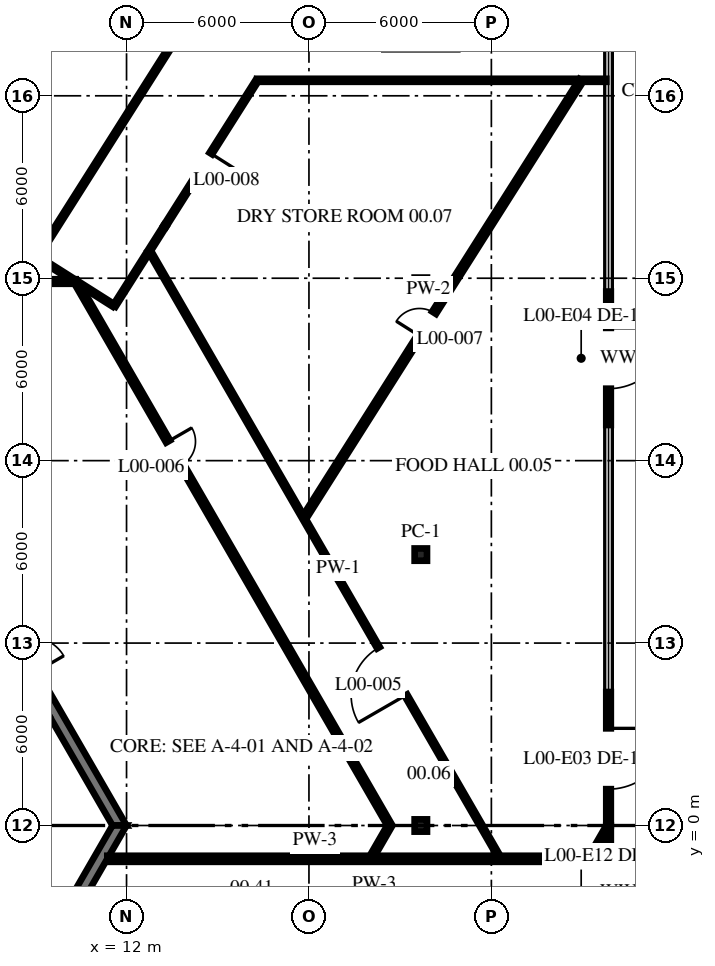
"""IFC4 building model, lengths in metres.
Left out: names, types, materials, properties, quantities, classifications, styles, units other than length and angle.
Written with IfcOpenShell. Run it as: python <this file> out.ifc"""

import sys

from ifc_helpers import new_model, si_unit, direction, frame, frame_2d, origin, origin_2d, place, context, subcontext, project, spatial, polyline, rectangle, i_section, outline, extrude, source, transform, mapped, element, fill, save


model = new_model("IFC4")
c1 = context("Model", 3, precision=1e-05, world=origin(), true_north=direction((0.0, 1.0)))
c2 = subcontext(c1, "Body", "Model", "MODEL_VIEW")
j1 = project(units=[si_unit("LENGTHUNIT", "METRE"), si_unit("PLANEANGLEUNIT", "RADIAN")], contexts=[c1])
p1 = place(None, origin())
s1 = spatial("IfcSite", under=j1, at=p1, CompositionType="ELEMENT")
p2 = place(p1, origin())
s2 = spatial("IfcBuilding", under=s1, at=p2, CompositionType="ELEMENT")
p3 = place(p2, origin())
s3 = spatial("IfcBuildingStorey", under=s2, at=p3, CompositionType="ELEMENT", Elevation=0.0)
m1 = source(origin(), c2, "Body", "SweptSolid", [
    extrude(i_section(OverallWidth=0.404, OverallDepth=0.406, WebThickness=0.027, FlangeThickness=0.044, at=origin_2d()), origin(), (0.0, 0.0, 1.0), 7.2),
])
for number, where, z_axis, x_axis in (
    (1, (21.679, 0.0, -0.2), (0.0, 0.0, 1.0), (0.0, 1.0, 0.0)),
    (2, (21.679, 8.91, -0.2), (0.0, 0.0, 1.0), (0.0, 1.0, 0.0)),
    (3, (21.679, 17.82, -0.2), (0.0, 0.0, 1.0), (0.0, 1.0, 0.0)),
):
    element("IfcColumn", number, at=place(p3, frame(where, z_axis=z_axis, x_axis=x_axis)), inside=s3, PredefinedType="COLUMN", context=c2, shape_type="MappedRepresentation", body=[
        mapped(m1, transform((0.0, 0.0, 0.0), scale=1.0)),
    ])
m2 = source(origin(), c2, "Body", "SweptSolid", [
    extrude(outline(polyline([(-0.115, -0.2), (11.885, -0.2), (11.654, 0.2), (0.115, 0.2), (-0.115, -0.2)])), origin(), (0.0, 0.0, 1.0), 7.0),
])
p4 = place(p3, frame((11.769, 0.0, -0.2), z_axis=(0.0, 0.0, 1.0), x_axis=(-0.499996592174, 0.866027371285, 0.0)))
e4 = element("IfcWall", 4, at=p4, inside=s3, PredefinedType="SHEAR", context=c2, shape_type="MappedRepresentation", body=[
    mapped(m2, transform((0.0, 0.0, 0.0), scale=1.0)),
])
p5 = place(p4, frame((5.75, 0.0, 0.2)))
e5 = element("IfcOpeningElement", 5, at=p5, cuts=e4, PredefinedType="OPENING", context=c2, shape_type="SweptSolid", body=[
    extrude(rectangle(XDim=1.2, YDim=2.1, at=frame_2d((0.6, 1.05))), frame((0.0, 0.21, 0.0), z_axis=(0.0, -1.0, 0.0), x_axis=(1.0, 0.0, 0.0)), (0.0, 0.0, 1.0), 0.42),
])
p6 = place(p3, frame((5.885, -10.192, -0.2), z_axis=(0.0, 0.0, 1.0), x_axis=(0.499996592174, 0.866027371285, 0.0)))
e6 = element("IfcWall", 6, at=p6, inside=s3, PredefinedType="SHEAR", context=c2, shape_type="MappedRepresentation", body=[
    mapped(m2, transform((0.0, 0.0, 0.0), scale=1.0)),
])
p7 = place(p6, frame((3.665, 0.0, 0.2)))
e7 = element("IfcOpeningElement", 7, at=p7, cuts=e6, PredefinedType="OPENING", context=c2, shape_type="SweptSolid", body=[
    extrude(rectangle(XDim=1.2, YDim=2.1, at=frame_2d((0.6, 1.05))), frame((0.0, 0.21, 0.0), z_axis=(0.0, -1.0, 0.0), x_axis=(1.0, 0.0, 0.0)), (0.0, 0.0, 1.0), 0.42),
])
m3 = source(origin(), c2, "Body", "SweptSolid", [
    extrude(rectangle(XDim=4.391, YDim=0.15, at=frame_2d((2.195, 0.0))), origin(), (0.0, 0.0, 1.0), 6.8),
])
p8 = place(p3, frame((27.854, 0.0, 0.0), z_axis=(0.0, 0.0, 1.0), x_axis=(0.0, -1.0, 0.0)))
e8 = element("IfcWall", 8, at=p8, inside=s3, PredefinedType="ELEMENTEDWALL", context=c2, shape_type="MappedRepresentation", body=[
    mapped(m3, transform((0.0, 0.0, 0.0), scale=1.0)),
])
p9 = place(p8, frame((1.195, 0.0, 0.0)))
e9 = element("IfcOpeningElement", 9, at=p9, cuts=e8, PredefinedType="OPENING", context=c2, shape_type="SweptSolid", body=[
    extrude(rectangle(XDim=2.0, YDim=2.7, at=frame_2d((1.0, 1.35))), frame((0.0, 0.085, 0.0), z_axis=(0.0, -1.0, 0.0), x_axis=(1.0, 0.0, 0.0)), (0.0, 0.0, 1.0), 0.17),
])
p10 = place(p3, frame((27.854, 4.391, 0.0), z_axis=(0.0, 0.0, 1.0), x_axis=(0.0, -1.0, 0.0)))
e10 = element("IfcWall", 10, at=p10, inside=s3, PredefinedType="ELEMENTEDWALL", context=c2, shape_type="MappedRepresentation", body=[
    mapped(m3, transform((0.0, 0.0, 0.0), scale=1.0)),
])
p11 = place(p10, frame((1.195, 0.0, 0.0)))
e11 = element("IfcOpeningElement", 11, at=p11, cuts=e10, PredefinedType="OPENING", context=c2, shape_type="SweptSolid", body=[
    extrude(rectangle(XDim=2.0, YDim=2.7, at=frame_2d((1.0, 1.35))), frame((0.0, 0.085, 0.0), z_axis=(0.0, -1.0, 0.0), x_axis=(1.0, 0.0, 0.0)), (0.0, 0.0, 1.0), 0.17),
])
m4 = source(origin(), c2, "Body", "SweptSolid", [
    extrude(rectangle(XDim=4.39, YDim=0.15, at=frame_2d((2.195, 0.0))), origin(), (0.0, 0.0, 1.0), 6.8),
])
p12 = place(p3, frame((27.854, 17.562, 0.0), z_axis=(0.0, 0.0, 1.0), x_axis=(0.0, -1.0, 0.0)))
e12 = element("IfcWall", 12, at=p12, inside=s3, PredefinedType="ELEMENTEDWALL", context=c2, shape_type="MappedRepresentation", body=[
    mapped(m4, transform((0.0, 0.0, 0.0), scale=1.0)),
])
p13 = place(p12, frame((1.195, 0.0, 0.0)))
e13 = element("IfcOpeningElement", 13, at=p13, cuts=e12, PredefinedType="OPENING", context=c2, shape_type="SweptSolid", body=[
    extrude(rectangle(XDim=2.0, YDim=2.7, at=frame_2d((1.0, 1.35))), frame((0.0, 0.085, 0.0), z_axis=(0.0, -1.0, 0.0), x_axis=(1.0, 0.0, 0.0)), (0.0, 0.0, 1.0), 0.17),
])
p14 = place(p3, frame((10.351, 17.856, 0.0), z_axis=(0.0, 0.0, 1.0), x_axis=(0.499999528265, -0.866025676141, 0.0)))
e14 = element("IfcWall", 14, at=p14, inside=s3, PredefinedType="PARTITIONING", context=c2, shape_type="SweptSolid", body=[
    extrude(rectangle(XDim=20.568, YDim=0.15, at=frame_2d((10.284, 0.0))), origin(), (0.0, 0.0, 1.0), 6.8),
])
p15 = place(p14, frame((6.034, 0.0, 0.0)))
e15 = element("IfcOpeningElement", 15, at=p15, cuts=e14, PredefinedType="OPENING", context=c2, shape_type="SweptSolid", body=[
    extrude(rectangle(XDim=0.9, YDim=2.1, at=frame_2d((0.45, 1.05))), frame((0.0, 0.085, 0.0), z_axis=(0.0, -1.0, 0.0), x_axis=(1.0, 0.0, 0.0)), (0.0, 0.0, 1.0), 0.17),
])
p16 = place(p3, frame((12.747, 18.905, 0.0), z_axis=(0.0, 0.0, 1.0), x_axis=(0.500003565856, -0.866023345027, 0.0)))
e16 = element("IfcWall", 16, at=p16, inside=s3, PredefinedType="PARTITIONING", context=c2, shape_type="SweptSolid", body=[
    extrude(rectangle(XDim=22.979, YDim=0.1, at=frame_2d((11.49, 0.0))), origin(), (0.0, 0.0, 1.0), 6.8),
])
p17 = place(p16, frame((15.08, 0.0, 0.0)))
e17 = element("IfcOpeningElement", 17, at=p17, cuts=e16, PredefinedType="OPENING", context=c2, shape_type="SweptSolid", body=[
    extrude(rectangle(XDim=1.8, YDim=2.4, at=frame_2d((0.9, 1.2))), frame((0.0, 0.06, 0.0), z_axis=(0.0, -1.0, 0.0), x_axis=(1.0, 0.0, 0.0)), (0.0, 0.0, 1.0), 0.12),
])
p18 = place(p3, frame((9.088, 18.679, 0.0), z_axis=(0.0, 0.0, 1.0), x_axis=(0.8447740423, -0.535123179704, 0.0)))
e18 = element("IfcWall", 18, at=p18, inside=s3, PredefinedType="PARTITIONING", context=c2, shape_type="SweptSolid", body=[
    extrude(rectangle(XDim=2.941, YDim=0.1, at=frame_2d((1.47, 0.0))), origin(), (0.0, 0.0, 1.0), 6.8),
])
p19 = place(p3, frame((-10.28, 17.892, 0.0), z_axis=(0.0, 0.0, 1.0), x_axis=(1.0, 0.0, 0.0)))
e19 = element("IfcWall", 19, at=p19, inside=s3, PredefinedType="PARTITIONING", context=c2, shape_type="SweptSolid", body=[
    extrude(rectangle(XDim=20.608, YDim=0.15, at=frame_2d((10.304, 0.0))), origin(), (0.0, 0.0, 1.0), 6.8),
])
p20 = place(p19, frame((4.162, 0.0, 0.0)))
e20 = element("IfcOpeningElement", 20, at=p20, cuts=e19, PredefinedType="OPENING", context=c2, shape_type="SweptSolid", body=[
    extrude(rectangle(XDim=1.8, YDim=2.4, at=frame_2d((0.9, 1.2))), frame((0.0, 0.085, 0.0), z_axis=(0.0, -1.0, 0.0), x_axis=(1.0, 0.0, 0.0)), (0.0, 0.0, 1.0), 0.17),
])
p21 = place(p19, frame((14.56, 0.0, 0.0)))
e21 = element("IfcOpeningElement", 21, at=p21, cuts=e19, PredefinedType="OPENING", context=c2, shape_type="SweptSolid", body=[
    extrude(rectangle(XDim=0.9, YDim=2.1, at=frame_2d((0.45, 1.05))), frame((0.0, 0.085, 0.0), z_axis=(0.0, -1.0, 0.0), x_axis=(1.0, 0.0, 0.0)), (0.0, 0.0, 1.0), 0.17),
])
p22 = place(p3, frame((16.298, 24.51, 0.0), z_axis=(0.0, 0.0, 1.0), x_axis=(1.0, 0.0, 0.0)))
e22 = element("IfcWall", 22, at=p22, inside=s3, PredefinedType="PARTITIONING", context=c2, shape_type="SweptSolid", body=[
    extrude(rectangle(XDim=11.482, YDim=0.1, at=frame_2d((5.741, 0.0))), origin(), (0.0, 0.0, 1.0), 6.8),
])
p23 = place(p3, frame((17.874, 10.168, 0.0), z_axis=(0.0, 0.0, 1.0), x_axis=(0.535111950981, 0.844781155044, 0.0)))
e23 = element("IfcWall", 23, at=p23, inside=s3, PredefinedType="PARTITIONING", context=c2, shape_type="SweptSolid", body=[
    extrude(rectangle(XDim=16.977, YDim=0.15, at=frame_2d((8.489, 0.0))), origin(), (0.0, 0.0, 1.0), 6.8),
])
p24 = place(p23, frame((7.027, 0.0, 0.0)))
e24 = element("IfcOpeningElement", 24, at=p24, cuts=e23, PredefinedType="OPENING", context=c2, shape_type="SweptSolid", body=[
    extrude(rectangle(XDim=0.9, YDim=2.1, at=frame_2d((0.45, 1.05))), frame((0.0, 0.085, 0.0), z_axis=(0.0, -1.0, 0.0), x_axis=(1.0, 0.0, 0.0)), (0.0, 0.0, 1.0), 0.17),
])
p25 = place(p3, frame((11.597, 17.09, 0.0), z_axis=(0.0, 0.0, 1.0), x_axis=(0.535087540536, 0.844796616922, 0.0)))
e25 = element("IfcWall", 25, at=p25, inside=s3, PredefinedType="PARTITIONING", context=c2, shape_type="SweptSolid", body=[
    extrude(rectangle(XDim=3.112, YDim=0.1, at=frame_2d((1.556, 0.0))), origin(), (0.0, 0.0, 1.0), 6.8),
])
p26 = place(p3, frame((13.263, 19.719, 0.0), z_axis=(0.0, 0.0, 1.0), x_axis=(0.535130183749, 0.844769605538, 0.0)))
e26 = element("IfcWall", 26, at=p26, inside=s3, PredefinedType="PARTITIONING", context=c2, shape_type="SweptSolid", body=[
    extrude(rectangle(XDim=5.652, YDim=0.1, at=frame_2d((2.826, 0.0))), origin(), (0.0, 0.0, 1.0), 6.117),
])
p27 = place(p26, frame((1.922, 0.0, 0.0)))
e27 = element("IfcOpeningElement", 27, at=p27, cuts=e26, PredefinedType="OPENING", context=c2, shape_type="SweptSolid", body=[
    extrude(rectangle(XDim=0.9, YDim=2.1, at=frame_2d((0.45, 1.05))), frame((0.0, 0.06, 0.0), z_axis=(0.0, -1.0, 0.0), x_axis=(1.0, 0.0, 0.0)), (0.0, 0.0, 1.0), 0.12),
])
p28 = place(p3, frame((9.063, 18.695, 0.0), z_axis=(0.0, 0.0, 1.0), x_axis=(0.535122771268, 0.844774301024, 0.0)))
e28 = element("IfcWall", 28, at=p28, inside=s3, PredefinedType="PARTITIONING", context=c2, shape_type="SweptSolid", body=[
    extrude(rectangle(XDim=8.216, YDim=0.1, at=frame_2d((4.108, 0.0))), origin(), (0.0, 0.0, 1.0), 6.8),
])
p29 = place(p3, frame((27.262, -0.995, 0.0), z_axis=(0.0, 0.0, 1.0), x_axis=(0.499962673433, 0.866046953215, 0.0)))
e29 = element("IfcWall", 29, at=p29, inside=s3, PredefinedType="PARTITIONING", context=c2, shape_type="SweptSolid", body=[
    extrude(rectangle(XDim=1.085, YDim=0.1, at=frame_2d((0.542, 0.0))), origin(), (0.0, 0.0, 1.0), 6.8),
])
p30 = place(p3, frame((20.085, -0.995, 0.0), z_axis=(0.0, 0.0, 1.0), x_axis=(0.500005339912, 0.866022320763, 0.0)))
e30 = element("IfcWall", 30, at=p30, inside=s3, PredefinedType="PARTITIONING", context=c2, shape_type="SweptSolid", body=[
    extrude(rectangle(XDim=1.121, YDim=0.15, at=frame_2d((0.56, 0.0))), origin(), (0.0, 0.0, 1.0), 6.8),
])
p31 = place(p3, frame((11.368, -1.095, 0.0), z_axis=(0.0, 0.0, 1.0), x_axis=(1.0, 0.0, 0.0)))
e31 = element("IfcWall", 31, at=p31, inside=s3, PredefinedType="PARTITIONING", context=c2, shape_type="SweptSolid", body=[
    extrude(rectangle(XDim=16.412, YDim=0.2, at=frame_2d((8.206, 0.0))), origin(), (0.0, 0.0, 1.0), 6.8),
])
p32 = place(p9, origin())
e32 = element("IfcDoor", 32, at=p32, inside=s3, OperationType="DOUBLE_DOOR_SINGLE_SWING", PredefinedType="DOOR", context=c2, shape_type="SweptSolid", body=[
    extrude(rectangle(XDim=2.0, YDim=2.7, at=frame_2d((1.0, 1.35))), frame((0.0, 0.025, 0.0), z_axis=(0.0, -1.0, 0.0), x_axis=(1.0, 0.0, 0.0)), (0.0, 0.0, 1.0), 0.05),
])
fill(e9, e32)
p33 = place(p11, origin())
e33 = element("IfcDoor", 33, at=p33, inside=s3, OperationType="DOUBLE_DOOR_SINGLE_SWING", PredefinedType="DOOR", context=c2, shape_type="SweptSolid", body=[
    extrude(rectangle(XDim=2.0, YDim=2.7, at=frame_2d((1.0, 1.35))), frame((0.0, 0.025, 0.0), z_axis=(0.0, -1.0, 0.0), x_axis=(1.0, 0.0, 0.0)), (0.0, 0.0, 1.0), 0.05),
])
fill(e11, e33)
p34 = place(p13, origin())
e34 = element("IfcDoor", 34, at=p34, inside=s3, OperationType="DOUBLE_DOOR_SINGLE_SWING", PredefinedType="DOOR", context=c2, shape_type="SweptSolid", body=[
    extrude(rectangle(XDim=2.0, YDim=2.7, at=frame_2d((1.0, 1.35))), frame((0.0, 0.025, 0.0), z_axis=(0.0, -1.0, 0.0), x_axis=(1.0, 0.0, 0.0)), (0.0, 0.0, 1.0), 0.05),
])
fill(e13, e34)
p35 = place(p17, origin())
e35 = element("IfcDoor", 35, at=p35, inside=s3, OperationType="DOUBLE_DOOR_SINGLE_SWING", PredefinedType="DOOR", context=c2, shape_type="SweptSolid", body=[
    extrude(rectangle(XDim=1.8, YDim=2.4, at=frame_2d((0.9, 1.2))), frame((0.0, 0.025, 0.0), z_axis=(0.0, -1.0, 0.0), x_axis=(1.0, 0.0, 0.0)), (0.0, 0.0, 1.0), 0.05),
])
fill(e17, e35)
p36 = place(p15, origin())
e36 = element("IfcDoor", 36, at=p36, inside=s3, OperationType="SINGLE_SWING_LEFT", PredefinedType="DOOR", context=c2, shape_type="SweptSolid", body=[
    extrude(rectangle(XDim=0.9, YDim=2.1, at=frame_2d((0.45, 1.05))), frame((0.0, 0.025, 0.0), z_axis=(0.0, -1.0, 0.0), x_axis=(1.0, 0.0, 0.0)), (0.0, 0.0, 1.0), 0.05),
])
fill(e15, e36)
p37 = place(p24, origin())
e37 = element("IfcDoor", 37, at=p37, inside=s3, OperationType="SINGLE_SWING_LEFT", PredefinedType="DOOR", context=c2, shape_type="SweptSolid", body=[
    extrude(rectangle(XDim=0.9, YDim=2.1, at=frame_2d((0.45, 1.05))), frame((0.0, 0.025, 0.0), z_axis=(0.0, -1.0, 0.0), x_axis=(1.0, 0.0, 0.0)), (0.0, 0.0, 1.0), 0.05),
])
fill(e24, e37)
p38 = place(p27, origin())
e38 = element("IfcDoor", 38, at=p38, inside=s3, OperationType="SINGLE_SWING_RIGHT", PredefinedType="DOOR", context=c2, shape_type="SweptSolid", body=[
    extrude(rectangle(XDim=0.9, YDim=2.1, at=frame_2d((0.45, 1.05))), frame((0.0, 0.025, 0.0), z_axis=(0.0, -1.0, 0.0), x_axis=(1.0, 0.0, 0.0)), (0.0, 0.0, 1.0), 0.05),
])
fill(e27, e38)
save(model, sys.argv[1])
